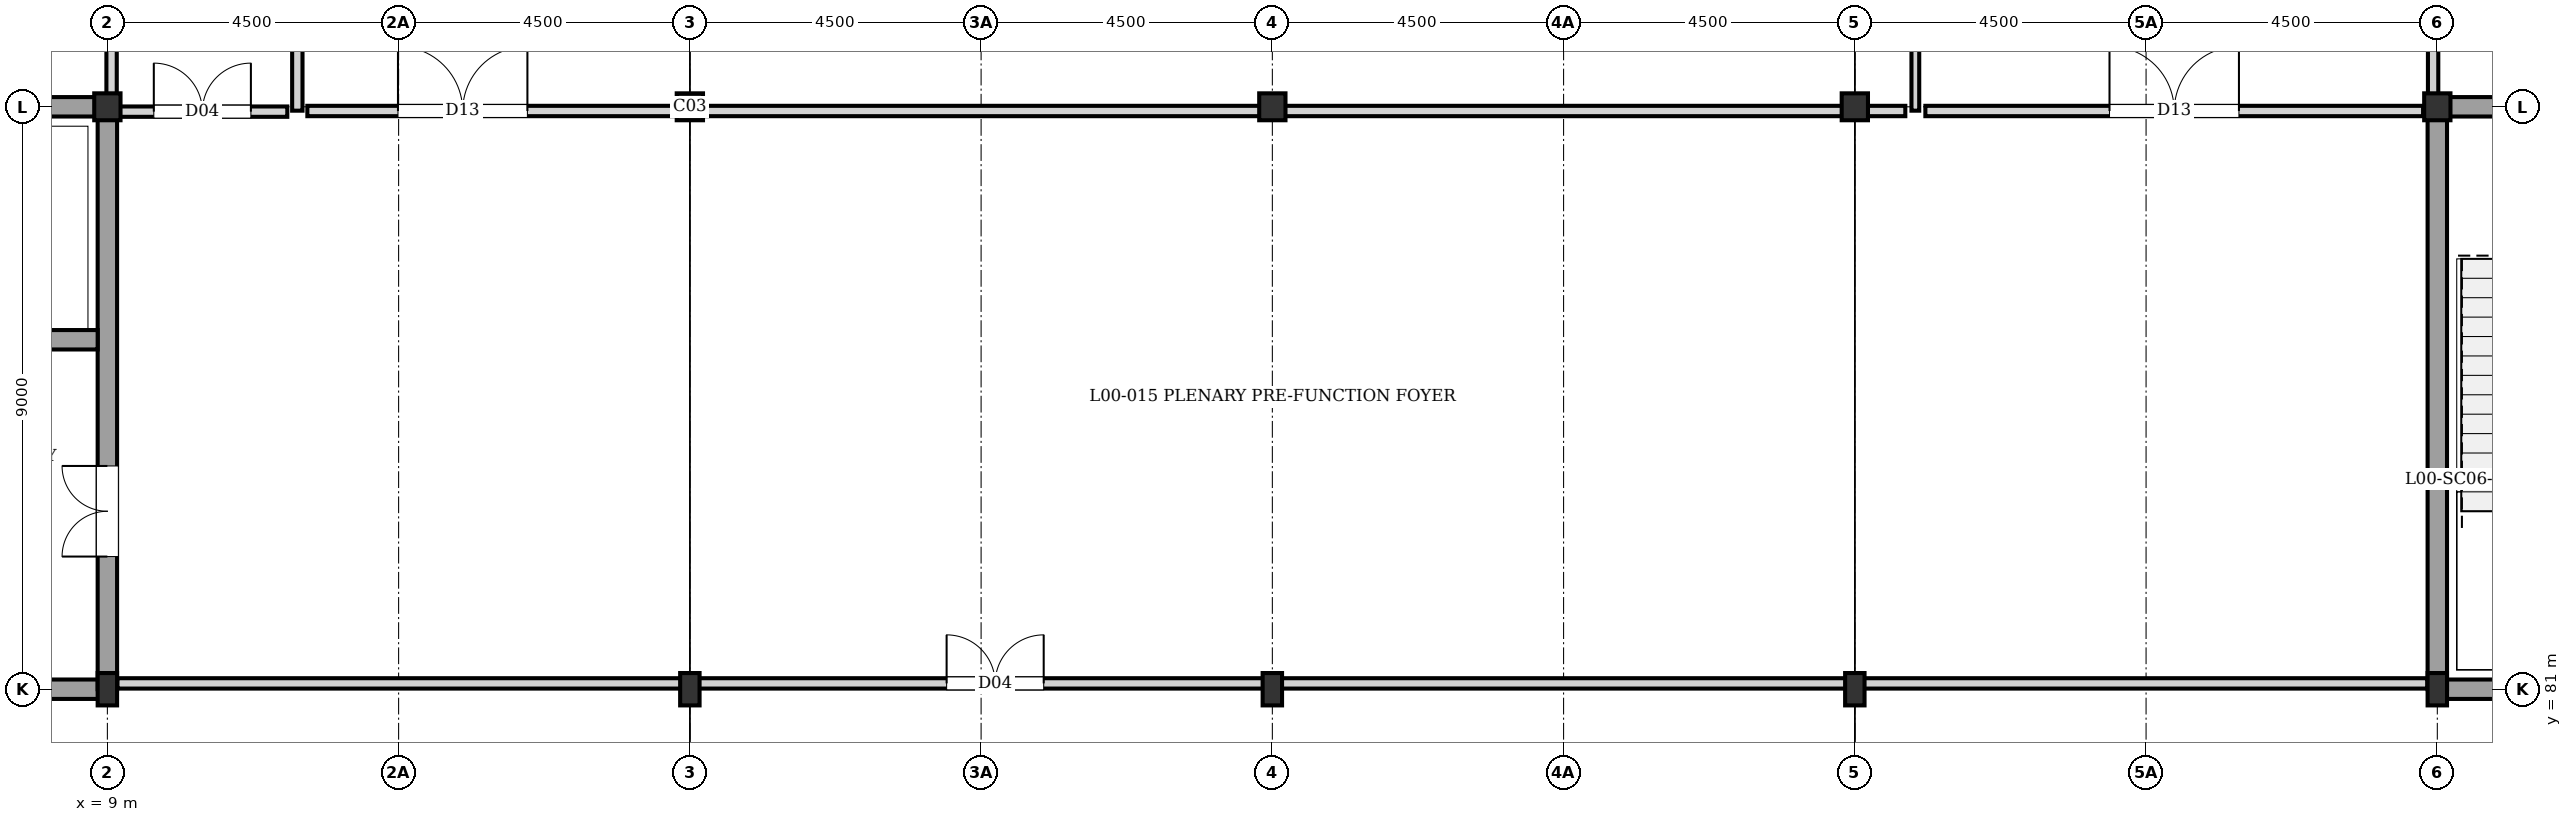
"""IFC4 building model, lengths in metres.
Left out: names, types, materials, properties, quantities, classifications, styles, units other than length and angle.
Written with IfcOpenShell. Run it as: python <this file> out.ifc"""

import sys

from ifc_helpers import new_model, si_unit, direction, frame, frame_2d, origin, origin_2d, place, context, subcontext, project, spatial, rectangle, i_section, extrude, element, fill, save


model = new_model("IFC4")
c1 = context("Model", 3, precision=1e-05, world=origin(), true_north=direction((0.0, 1.0)))
c2 = subcontext(c1, "Body", "Model", "MODEL_VIEW")
j1 = project(units=[si_unit("LENGTHUNIT", "METRE"), si_unit("PLANEANGLEUNIT", "RADIAN")], contexts=[c1])
p1 = place(None, origin())
s1 = spatial("IfcSite", under=j1, at=p1, CompositionType="ELEMENT")
p2 = place(p1, origin())
s2 = spatial("IfcBuilding", under=s1, at=p2, CompositionType="ELEMENT")
p3 = place(p2, origin())
s3 = spatial("IfcBuildingStorey", under=s2, at=p3, CompositionType="ELEMENT", Elevation=0.0)
p4 = place(p3, frame((9.0, 81.0, 0.0), z_axis=(0.0, 0.0, 1.0), x_axis=(1.0, 0.0, 0.0)))
e1 = element("IfcColumn", 1, at=p4, inside=s3, PredefinedType="COLUMN", context=c2, shape_type="SweptSolid", body=[
    extrude(i_section(OverallWidth=0.3, OverallDepth=0.5, WebThickness=0.014, FlangeThickness=0.028, at=origin_2d()), origin(), (0.0, 0.0, 1.0), 4.32),
])
p5 = place(p3, frame((9.0, 90.0, 0.0), z_axis=(0.0, 0.0, 1.0), x_axis=(1.0, 0.0, 0.0)))
e2 = element("IfcColumn", 2, at=p5, inside=s3, PredefinedType="COLUMN", context=c2, shape_type="SweptSolid", body=[
    extrude(i_section(OverallWidth=0.406, OverallDepth=0.416, WebThickness=0.022, FlangeThickness=0.038, at=origin_2d()), origin(), (0.0, 0.0, 1.0), 4.32),
])
p6 = place(p3, frame((18.0, 81.0, 0.0), z_axis=(0.0, 0.0, 1.0), x_axis=(1.0, 0.0, 0.0)))
e3 = element("IfcColumn", 3, at=p6, inside=s3, PredefinedType="COLUMN", context=c2, shape_type="SweptSolid", body=[
    extrude(i_section(OverallWidth=0.3, OverallDepth=0.5, WebThickness=0.014, FlangeThickness=0.028, at=origin_2d()), origin(), (0.0, 0.0, 1.0), 4.32),
])
p7 = place(p3, frame((18.0, 90.0, 0.0), z_axis=(0.0, 0.0, 1.0), x_axis=(1.0, 0.0, 0.0)))
e4 = element("IfcColumn", 4, at=p7, inside=s3, PredefinedType="COLUMN", context=c2, shape_type="SweptSolid", body=[
    extrude(i_section(OverallWidth=0.406, OverallDepth=0.416, WebThickness=0.022, FlangeThickness=0.038, at=origin_2d()), origin(), (0.0, 0.0, 1.0), 4.32),
])
p8 = place(p3, frame((27.0, 81.0, 0.0), z_axis=(0.0, 0.0, 1.0), x_axis=(1.0, 0.0, 0.0)))
e5 = element("IfcColumn", 5, at=p8, inside=s3, PredefinedType="COLUMN", context=c2, shape_type="SweptSolid", body=[
    extrude(i_section(OverallWidth=0.3, OverallDepth=0.5, WebThickness=0.014, FlangeThickness=0.028, at=origin_2d()), origin(), (0.0, 0.0, 1.0), 4.32),
])
p9 = place(p3, frame((27.0, 90.0, 0.0), z_axis=(0.0, 0.0, 1.0), x_axis=(1.0, 0.0, 0.0)))
e6 = element("IfcColumn", 6, at=p9, inside=s3, PredefinedType="COLUMN", context=c2, shape_type="SweptSolid", body=[
    extrude(i_section(OverallWidth=0.406, OverallDepth=0.416, WebThickness=0.022, FlangeThickness=0.038, at=origin_2d()), origin(), (0.0, 0.0, 1.0), 4.32),
])
p10 = place(p3, frame((36.0, 81.0, 0.0), z_axis=(0.0, 0.0, 1.0), x_axis=(1.0, 0.0, 0.0)))
e7 = element("IfcColumn", 7, at=p10, inside=s3, PredefinedType="COLUMN", context=c2, shape_type="SweptSolid", body=[
    extrude(i_section(OverallWidth=0.3, OverallDepth=0.5, WebThickness=0.014, FlangeThickness=0.028, at=origin_2d()), origin(), (0.0, 0.0, 1.0), 4.32),
])
p11 = place(p3, frame((36.0, 90.0, 0.0), z_axis=(0.0, 0.0, 1.0), x_axis=(1.0, 0.0, 0.0)))
e8 = element("IfcColumn", 8, at=p11, inside=s3, PredefinedType="COLUMN", context=c2, shape_type="SweptSolid", body=[
    extrude(i_section(OverallWidth=0.406, OverallDepth=0.416, WebThickness=0.022, FlangeThickness=0.038, at=origin_2d()), origin(), (0.0, 0.0, 1.0), 4.32),
])
p12 = place(p3, frame((45.0, 81.0, 0.0), z_axis=(0.0, 0.0, 1.0), x_axis=(1.0, 0.0, 0.0)))
e9 = element("IfcColumn", 9, at=p12, inside=s3, PredefinedType="COLUMN", context=c2, shape_type="SweptSolid", body=[
    extrude(i_section(OverallWidth=0.3, OverallDepth=0.5, WebThickness=0.014, FlangeThickness=0.028, at=origin_2d()), origin(), (0.0, 0.0, 1.0), 4.32),
])
p13 = place(p3, frame((45.0, 90.0, 0.0), z_axis=(0.0, 0.0, 1.0), x_axis=(1.0, 0.0, 0.0)))
e10 = element("IfcColumn", 10, at=p13, inside=s3, PredefinedType="COLUMN", context=c2, shape_type="SweptSolid", body=[
    extrude(i_section(OverallWidth=0.406, OverallDepth=0.416, WebThickness=0.022, FlangeThickness=0.038, at=origin_2d()), origin(), (0.0, 0.0, 1.0), 4.32),
])
p14 = place(p3, frame((0.0, 81.0, 0.0), z_axis=(0.0, 0.0, 1.0), x_axis=(1.0, 0.0, 0.0)))
e11 = element("IfcWall", 11, at=p14, inside=s3, PredefinedType="SHEAR", context=c2, shape_type="SweptSolid", body=[
    extrude(rectangle(XDim=9.0, YDim=0.3, at=frame_2d((4.5, 0.0))), origin(), (0.0, 0.0, 1.0), 4.055),
])
p15 = place(p3, frame((9.0, 81.0, 0.0), z_axis=(0.0, 0.0, 1.0), x_axis=(0.0, 1.0, 0.0)))
e12 = element("IfcWall", 12, at=p15, inside=s3, PredefinedType="SHEAR", context=c2, shape_type="SweptSolid", body=[
    extrude(rectangle(XDim=9.0, YDim=0.3, at=frame_2d((4.5, 0.0))), origin(), (0.0, 0.0, 1.0), 4.055),
])
p16 = place(p15, frame((2.05, 0.0, 0.0)))
e13 = element("IfcOpeningElement", 13, at=p16, cuts=e12, PredefinedType="OPENING", context=c2, shape_type="SweptSolid", body=[
    extrude(rectangle(XDim=1.4, YDim=2.02, at=frame_2d((0.7, 1.01))), frame((0.0, 0.16, 0.0), z_axis=(0.0, -1.0, 0.0), x_axis=(1.0, 0.0, 0.0)), (0.0, 0.0, 1.0), 0.32),
])
p17 = place(p3, frame((0.0, 90.0, 0.0), z_axis=(0.0, 0.0, 1.0), x_axis=(1.0, 0.0, 0.0)))
e14 = element("IfcWall", 14, at=p17, inside=s3, PredefinedType="SHEAR", context=c2, shape_type="SweptSolid", body=[
    extrude(rectangle(XDim=9.0, YDim=0.3, at=frame_2d((4.5, 0.0))), origin(), (0.0, 0.0, 1.0), 4.055),
])
p18 = place(p3, frame((4.65, 86.4, 0.0), z_axis=(0.0, 0.0, 1.0), x_axis=(1.0, 0.0, 0.0)))
e15 = element("IfcWall", 15, at=p18, inside=s3, PredefinedType="SHEAR", context=c2, shape_type="SweptSolid", body=[
    extrude(rectangle(XDim=4.2, YDim=0.3, at=frame_2d((2.1, 0.0))), origin(), (0.0, 0.0, 1.0), 4.055),
])
p19 = place(p18, frame((1.5, 0.0, 0.0)))
e16 = element("IfcOpeningElement", 16, at=p19, cuts=e15, PredefinedType="OPENING", context=c2, shape_type="SweptSolid", body=[
    extrude(rectangle(XDim=1.2, YDim=2.2, at=frame_2d((0.6, 1.1))), frame((0.0, 0.16, 0.0), z_axis=(0.0, -1.0, 0.0), x_axis=(1.0, 0.0, 0.0)), (0.0, 0.0, 1.0), 0.32),
])
p20 = place(p3, frame((45.0, 81.0, 0.0), z_axis=(0.0, 0.0, 1.0), x_axis=(1.0, 0.0, 0.0)))
e17 = element("IfcWall", 17, at=p20, inside=s3, PredefinedType="SHEAR", context=c2, shape_type="SweptSolid", body=[
    extrude(rectangle(XDim=9.0, YDim=0.3, at=frame_2d((4.5, 0.0))), origin(), (0.0, 0.0, 1.0), 4.055),
])
p21 = place(p3, frame((45.0, 90.0, 0.0), z_axis=(0.0, 0.0, 1.0), x_axis=(1.0, 0.0, 0.0)))
e18 = element("IfcWall", 18, at=p21, inside=s3, PredefinedType="SHEAR", context=c2, shape_type="SweptSolid", body=[
    extrude(rectangle(XDim=9.0, YDim=0.3, at=frame_2d((4.5, 0.0))), origin(), (0.0, 0.0, 1.0), 4.055),
])
p22 = place(p21, frame((6.05, 0.0, 0.0)))
e19 = element("IfcOpeningElement", 19, at=p22, cuts=e18, PredefinedType="OPENING", context=c2, shape_type="SweptSolid", body=[
    extrude(rectangle(XDim=1.4, YDim=2.02, at=frame_2d((0.7, 1.01))), frame((0.0, 0.16, 0.0), z_axis=(0.0, -1.0, 0.0), x_axis=(1.0, 0.0, 0.0)), (0.0, 0.0, 1.0), 0.32),
])
p23 = place(p3, frame((45.0, 81.0, 0.0), z_axis=(0.0, 0.0, 1.0), x_axis=(0.0, 1.0, 0.0)))
e20 = element("IfcWall", 20, at=p23, inside=s3, PredefinedType="SHEAR", context=c2, shape_type="SweptSolid", body=[
    extrude(rectangle(XDim=9.0, YDim=0.3, at=frame_2d((4.5, 0.0))), origin(), (0.0, 0.0, 1.0), 4.055),
])
p24 = place(p3, frame((11.935, 89.94, 0.0), z_axis=(0.0, 0.0, 1.0), x_axis=(0.0, 1.0, 0.0)))
e21 = element("IfcWall", 21, at=p24, inside=s3, PredefinedType="PARTITIONING", context=c2, shape_type="SweptSolid", body=[
    extrude(rectangle(XDim=23.845, YDim=0.16, at=frame_2d((11.922, 0.0))), origin(), (0.0, 0.0, 1.0), 4.055),
])
p25 = place(p3, frame((36.935, 89.94, 0.0), z_axis=(0.0, 0.0, 1.0), x_axis=(0.0, 1.0, 0.0)))
e22 = element("IfcWall", 22, at=p25, inside=s3, PredefinedType="PARTITIONING", context=c2, shape_type="SweptSolid", body=[
    extrude(rectangle(XDim=23.845, YDim=0.12, at=frame_2d((11.922, 0.0))), origin(), (0.0, 0.0, 1.0), 4.055),
])
p26 = place(p3, frame((44.935, 90.155, 0.0), z_axis=(0.0, 0.0, 1.0), x_axis=(0.0, 1.0, 0.0)))
e23 = element("IfcWall", 23, at=p26, inside=s3, PredefinedType="PARTITIONING", context=c2, shape_type="SweptSolid", body=[
    extrude(rectangle(XDim=3.775, YDim=0.16, at=frame_2d((1.887, 0.0))), origin(), (0.0, 0.0, 1.0), 4.055),
])
p27 = place(p3, frame((9.155, 89.925, 0.0), z_axis=(0.0, 0.0, 1.0), x_axis=(1.0, 0.0, 0.0)))
e24 = element("IfcWall", 24, at=p27, inside=s3, PredefinedType="PARTITIONING", context=c2, shape_type="SweptSolid", body=[
    extrude(rectangle(XDim=2.625, YDim=0.16, at=frame_2d((1.312, 0.0))), origin(), (0.0, 0.0, 1.0), 3.655),
])
p28 = place(p27, frame((0.562, 0.0, 0.0)))
e25 = element("IfcOpeningElement", 25, at=p28, cuts=e24, PredefinedType="OPENING", context=c2, shape_type="SweptSolid", body=[
    extrude(rectangle(XDim=1.5, YDim=2.1, at=frame_2d((0.75, 1.05))), frame((0.0, 0.09, 0.0), z_axis=(0.0, -1.0, 0.0), x_axis=(1.0, 0.0, 0.0)), (0.0, 0.0, 1.0), 0.18),
])
p29 = place(p3, frame((12.09, 89.935, 0.0), z_axis=(0.0, 0.0, 1.0), x_axis=(1.0, 0.0, 0.0)))
e26 = element("IfcWall", 26, at=p29, inside=s3, PredefinedType="PARTITIONING", context=c2, shape_type="SweptSolid", body=[
    extrude(rectangle(XDim=5.89, YDim=0.16, at=frame_2d((2.945, 0.0))), origin(), (0.0, 0.0, 1.0), 3.655),
])
p30 = place(p29, frame((1.4, 0.0, 0.0)))
e27 = element("IfcOpeningElement", 27, at=p30, cuts=e26, PredefinedType="OPENING", context=c2, shape_type="SweptSolid", body=[
    extrude(rectangle(XDim=2.0, YDim=2.35, at=frame_2d((1.0, 1.175))), frame((0.0, 0.09, 0.0), z_axis=(0.0, -1.0, 0.0), x_axis=(1.0, 0.0, 0.0)), (0.0, 0.0, 1.0), 0.18),
])
p31 = place(p3, frame((37.09, 89.935, 0.0), z_axis=(0.0, 0.0, 1.0), x_axis=(1.0, 0.0, 0.0)))
e28 = element("IfcWall", 28, at=p31, inside=s3, PredefinedType="PARTITIONING", context=c2, shape_type="SweptSolid", body=[
    extrude(rectangle(XDim=7.69, YDim=0.16, at=frame_2d((3.845, 0.0))), origin(), (0.0, 0.0, 1.0), 3.505),
])
p32 = place(p31, frame((2.845, 0.0, 0.0)))
e29 = element("IfcOpeningElement", 29, at=p32, cuts=e28, PredefinedType="OPENING", context=c2, shape_type="SweptSolid", body=[
    extrude(rectangle(XDim=2.0, YDim=2.35, at=frame_2d((1.0, 1.175))), frame((0.0, 0.09, 0.0), z_axis=(0.0, -1.0, 0.0), x_axis=(1.0, 0.0, 0.0)), (0.0, 0.0, 1.0), 0.18),
])
p33 = place(p3, frame((9.155, 81.09, 0.0), z_axis=(0.0, 0.0, 1.0), x_axis=(1.0, 0.0, 0.0)))
e30 = element("IfcWall", 30, at=p33, inside=s3, PredefinedType="PARTITIONING", context=c2, shape_type="SweptSolid", body=[
    extrude(rectangle(XDim=8.865, YDim=0.16, at=frame_2d((4.433, 0.0))), origin(), (0.0, 0.0, 1.0), 3.655),
])
p34 = place(p3, frame((9.065, 90.08, 0.0), z_axis=(0.0, 0.0, 1.0), x_axis=(0.0, 1.0, 0.0)))
e31 = element("IfcWall", 31, at=p34, inside=s3, PredefinedType="PARTITIONING", context=c2, shape_type="SweptSolid", body=[
    extrude(rectangle(XDim=8.94, YDim=0.16, at=frame_2d((4.47, 0.0))), origin(), (0.0, 0.0, 1.0), 3.365),
])
p35 = place(p3, frame((17.98, 89.935, 0.0), z_axis=(0.0, 0.0, 1.0), x_axis=(1.0, 0.0, 0.0)))
e32 = element("IfcWall", 32, at=p35, inside=s3, PredefinedType="PARTITIONING", context=c2, shape_type="SweptSolid", body=[
    extrude(rectangle(XDim=9.0, YDim=0.16, at=frame_2d((4.5, 0.0))), origin(), (0.0, 0.0, 1.0), 3.605),
])
p36 = place(p3, frame((26.98, 89.935, 0.0), z_axis=(0.0, 0.0, 1.0), x_axis=(1.0, 0.0, 0.0)))
e33 = element("IfcWall", 33, at=p36, inside=s3, PredefinedType="PARTITIONING", context=c2, shape_type="SweptSolid", body=[
    extrude(rectangle(XDim=9.0, YDim=0.16, at=frame_2d((4.5, 0.0))), origin(), (0.0, 0.0, 1.0), 3.555),
])
p37 = place(p3, frame((35.98, 89.935, 0.0), z_axis=(0.0, 0.0, 1.0), x_axis=(1.0, 0.0, 0.0)))
e34 = element("IfcWall", 34, at=p37, inside=s3, PredefinedType="PARTITIONING", context=c2, shape_type="SweptSolid", body=[
    extrude(rectangle(XDim=0.8, YDim=0.16, at=frame_2d((0.4, 0.0))), origin(), (0.0, 0.0, 1.0), 3.505),
])
p38 = place(p3, frame((18.02, 81.09, 0.0), z_axis=(0.0, 0.0, 1.0), x_axis=(1.0, 0.0, 0.0)))
e35 = element("IfcWall", 35, at=p38, inside=s3, PredefinedType="PARTITIONING", context=c2, shape_type="SweptSolid", body=[
    extrude(rectangle(XDim=8.96, YDim=0.16, at=frame_2d((4.48, 0.0))), origin(), (0.0, 0.0, 1.0), 3.825),
])
p39 = place(p38, frame((3.947, 0.0, 0.0)))
e36 = element("IfcOpeningElement", 36, at=p39, cuts=e35, PredefinedType="OPENING", context=c2, shape_type="SweptSolid", body=[
    extrude(rectangle(XDim=1.5, YDim=2.1, at=frame_2d((0.75, 1.05))), frame((0.0, 0.09, 0.0), z_axis=(0.0, -1.0, 0.0), x_axis=(1.0, 0.0, 0.0)), (0.0, 0.0, 1.0), 0.18),
])
p40 = place(p3, frame((26.98, 81.09, 0.0), z_axis=(0.0, 0.0, 1.0), x_axis=(1.0, 0.0, 0.0)))
e37 = element("IfcWall", 37, at=p40, inside=s3, PredefinedType="PARTITIONING", context=c2, shape_type="SweptSolid", body=[
    extrude(rectangle(XDim=9.0, YDim=0.16, at=frame_2d((4.5, 0.0))), origin(), (0.0, 0.0, 1.0), 3.755),
])
p41 = place(p3, frame((35.98, 81.09, 0.0), z_axis=(0.0, 0.0, 1.0), x_axis=(1.0, 0.0, 0.0)))
e38 = element("IfcWall", 38, at=p41, inside=s3, PredefinedType="PARTITIONING", context=c2, shape_type="SweptSolid", body=[
    extrude(rectangle(XDim=8.865, YDim=0.16, at=frame_2d((4.433, 0.0))), origin(), (0.0, 0.0, 1.0), 3.695),
])
p42 = place(p16, origin())
e39 = element("IfcDoor", 39, at=p42, inside=s3, OperationType="DOUBLE_DOOR_SINGLE_SWING", PredefinedType="DOOR", context=c2, shape_type="SweptSolid", body=[
    extrude(rectangle(XDim=1.4, YDim=2.02, at=frame_2d((0.7, 1.01))), frame((0.0, 0.025, 0.0), z_axis=(0.0, -1.0, 0.0), x_axis=(1.0, 0.0, 0.0)), (0.0, 0.0, 1.0), 0.05),
])
fill(e13, e39)
p43 = place(p28, origin())
e40 = element("IfcDoor", 40, at=p43, inside=s3, OperationType="DOUBLE_DOOR_SINGLE_SWING", PredefinedType="DOOR", context=c2, shape_type="SweptSolid", body=[
    extrude(rectangle(XDim=1.5, YDim=2.1, at=frame_2d((0.75, 1.05))), frame((0.0, 0.025, 0.0), z_axis=(0.0, -1.0, 0.0), x_axis=(1.0, 0.0, 0.0)), (0.0, 0.0, 1.0), 0.05),
])
fill(e25, e40)
p44 = place(p30, origin())
e41 = element("IfcDoor", 41, at=p44, inside=s3, OperationType="DOUBLE_DOOR_SINGLE_SWING", PredefinedType="DOOR", context=c2, shape_type="SweptSolid", body=[
    extrude(rectangle(XDim=2.0, YDim=2.35, at=frame_2d((1.0, 1.175))), frame((0.0, 0.025, 0.0), z_axis=(0.0, -1.0, 0.0), x_axis=(1.0, 0.0, 0.0)), (0.0, 0.0, 1.0), 0.05),
])
fill(e27, e41)
p45 = place(p32, origin())
e42 = element("IfcDoor", 42, at=p45, inside=s3, OperationType="DOUBLE_DOOR_SINGLE_SWING", PredefinedType="DOOR", context=c2, shape_type="SweptSolid", body=[
    extrude(rectangle(XDim=2.0, YDim=2.35, at=frame_2d((1.0, 1.175))), frame((0.0, 0.025, 0.0), z_axis=(0.0, -1.0, 0.0), x_axis=(1.0, 0.0, 0.0)), (0.0, 0.0, 1.0), 0.05),
])
fill(e29, e42)
p46 = place(p39, origin())
e43 = element("IfcDoor", 43, at=p46, inside=s3, OperationType="DOUBLE_DOOR_SINGLE_SWING", PredefinedType="DOOR", context=c2, shape_type="SweptSolid", body=[
    extrude(rectangle(XDim=1.5, YDim=2.1, at=frame_2d((0.75, 1.05))), frame((0.0, 0.025, 0.0), z_axis=(0.0, -1.0, 0.0), x_axis=(1.0, 0.0, 0.0)), (0.0, 0.0, 1.0), 0.05),
])
fill(e36, e43)
save(model, sys.argv[1])
